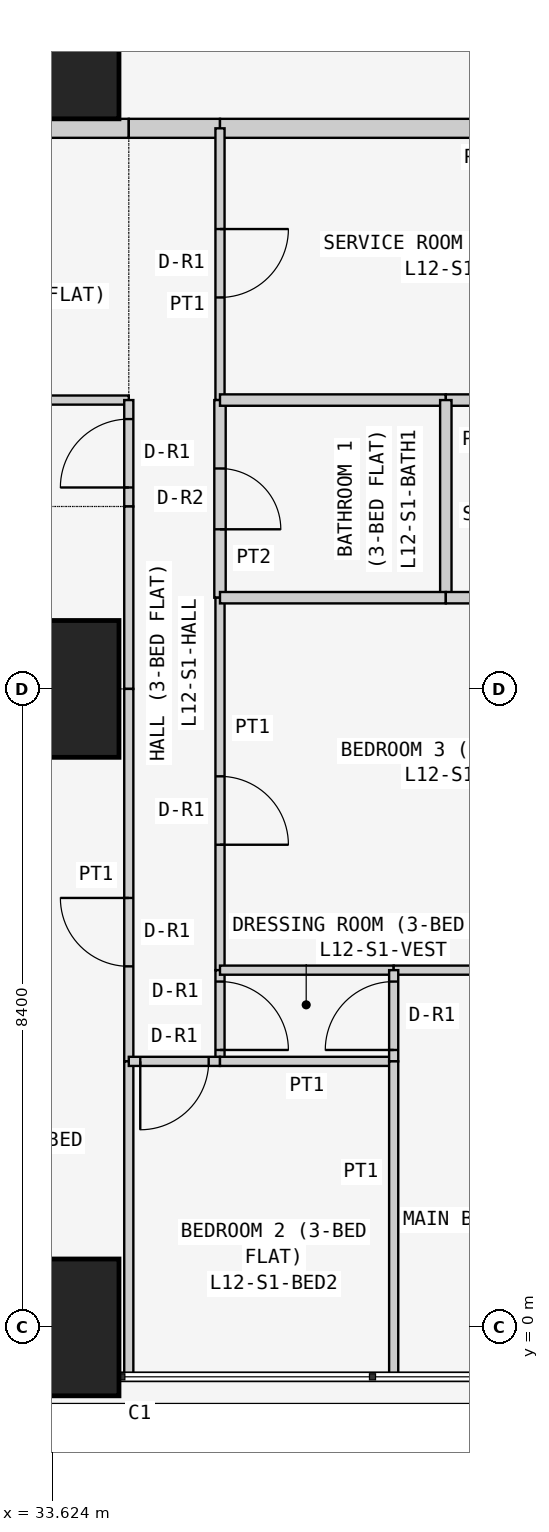
"""IFC4 building model, lengths in metres.
Left out: names, types, materials, properties, quantities, classifications, styles, units other than length and angle.
Written with IfcOpenShell. Run it as: python <this file> out.ifc"""

import sys

from ifc_helpers import new_model, si_unit, direction, frame, frame_2d, origin, origin_2d, place, context, subcontext, project, spatial, rectangle, extrude, element, fill, save


model = new_model("IFC4")
c1 = context("Model", 3, precision=1e-05, world=origin(), true_north=direction((0.0, 1.0)))
c2 = subcontext(c1, "Body", "Model", "MODEL_VIEW")
j1 = project(units=[si_unit("LENGTHUNIT", "METRE"), si_unit("PLANEANGLEUNIT", "RADIAN")], contexts=[c1])
p1 = place(None, origin())
s1 = spatial("IfcSite", under=j1, at=p1, CompositionType="ELEMENT")
p2 = place(p1, origin())
s2 = spatial("IfcBuilding", under=s1, at=p2, CompositionType="ELEMENT")
p3 = place(p2, frame((0.0, 0.0, 52.5)))
s3 = spatial("IfcBuildingStorey", under=s2, at=p3, CompositionType="ELEMENT", Elevation=52.5)
for number, where, z_axis, x_axis in (
    (1, (33.6, 0.0, 0.0), (0.0, 0.0, 1.0), (1.0, 0.0, 0.0)),
    (2, (33.6, 8.4, 0.0), (0.0, 0.0, 1.0), (1.0, 0.0, 0.0)),
    (3, (33.6, 16.8, 0.0), (0.0, 0.0, 1.0), (1.0, 0.0, 0.0)),
):
    element("IfcColumn", number, at=place(p3, frame(where, z_axis=z_axis, x_axis=x_axis)), inside=s3, PredefinedType="COLUMN", context=c2, shape_type="SweptSolid", body=[
        extrude(rectangle(XDim=1.8, YDim=1.8, at=origin_2d()), origin(), (0.0, 0.0, 1.0), 3.6),
    ])
p4 = place(p3, frame((34.629, 15.775, 0.0), z_axis=(0.0, 0.0, 1.0), x_axis=(-1.0, 0.0, 0.0)))
e4 = element("IfcWall", 4, at=p4, inside=s3, PredefinedType="PARTITIONING", context=c2, shape_type="SweptSolid", body=[
    extrude(rectangle(XDim=5.229, YDim=0.25, at=frame_2d((2.615, 0.0))), origin(), (0.0, 0.0, 1.0), 3.45),
])
p5 = place(p4, frame((2.129, 0.0, 0.0)))
e5 = element("IfcOpeningElement", 5, at=p5, cuts=e4, PredefinedType="OPENING", context=c2, shape_type="SweptSolid", body=[
    extrude(rectangle(XDim=1.0, YDim=2.1, at=frame_2d((0.5, 1.05))), frame((0.0, 0.135, 0.0), z_axis=(0.0, -1.0, 0.0), x_axis=(1.0, 0.0, 0.0)), (0.0, 0.0, 1.0), 0.27),
])
p6 = place(p3, frame((35.829, 15.775, 0.0), z_axis=(0.0, 0.0, 1.0), x_axis=(-1.0, 0.0, 0.0)))
e6 = element("IfcWall", 6, at=p6, inside=s3, PredefinedType="PARTITIONING", context=c2, shape_type="SweptSolid", body=[
    extrude(rectangle(XDim=1.2, YDim=0.25, at=frame_2d((0.6, 0.0))), origin(), (0.0, 0.0, 1.0), 3.45),
])
p7 = place(p3, frame((42.7, 15.775, 0.0), z_axis=(0.0, 0.0, 1.0), x_axis=(-1.0, 0.0, 0.0)))
e7 = element("IfcWall", 7, at=p7, inside=s3, PredefinedType="PARTITIONING", context=c2, shape_type="SweptSolid", body=[
    extrude(rectangle(XDim=6.871, YDim=0.25, at=frame_2d((3.436, 0.0))), origin(), (0.0, 0.0, 1.0), 3.45),
])
p8 = place(p3, frame((29.4, 12.2, 0.0), z_axis=(0.0, 0.0, 1.0), x_axis=(1.0, 0.0, 0.0)))
e8 = element("IfcWall", 8, at=p8, inside=s3, PredefinedType="PARTITIONING", context=c2, shape_type="SweptSolid", body=[
    extrude(rectangle(XDim=5.229, YDim=0.12, at=frame_2d((2.615, 0.0))), origin(), (0.0, 0.0, 1.0), 3.45),
])
p9 = place(p3, frame((34.629, 10.8, 0.0), z_axis=(0.0, 0.0, 1.0), x_axis=(0.0, 1.0, 0.0)))
e9 = element("IfcWall", 9, at=p9, inside=s3, PredefinedType="PARTITIONING", context=c2, shape_type="SweptSolid", body=[
    extrude(rectangle(XDim=1.4, YDim=0.12, at=frame_2d((0.7, 0.0))), origin(), (0.0, 0.0, 1.0), 3.45),
])
p10 = place(p9, frame((0.25, 0.0, 0.0)))
e10 = element("IfcOpeningElement", 10, at=p10, cuts=e9, PredefinedType="OPENING", context=c2, shape_type="SweptSolid", body=[
    extrude(rectangle(XDim=0.9, YDim=2.1, at=frame_2d((0.45, 1.05))), frame((0.0, 0.07, 0.0), z_axis=(0.0, -1.0, 0.0), x_axis=(1.0, 0.0, 0.0)), (0.0, 0.0, 1.0), 0.14),
])
p11 = place(p3, frame((34.629, 8.4, 0.0), z_axis=(0.0, 0.0, 1.0), x_axis=(0.0, 1.0, 0.0)))
e11 = element("IfcWall", 11, at=p11, inside=s3, PredefinedType="PARTITIONING", context=c2, shape_type="SweptSolid", body=[
    extrude(rectangle(XDim=2.4, YDim=0.12, at=frame_2d((1.2, 0.0))), origin(), (0.0, 0.0, 1.0), 3.45),
])
p12 = place(p3, frame((34.629, 3.5, 0.0), z_axis=(0.0, 0.0, 1.0), x_axis=(0.0, 1.0, 0.0)))
e12 = element("IfcWall", 12, at=p12, inside=s3, PredefinedType="PARTITIONING", context=c2, shape_type="SweptSolid", body=[
    extrude(rectangle(XDim=4.9, YDim=0.12, at=frame_2d((2.45, 0.0))), origin(), (0.0, 0.0, 1.0), 3.45),
])
p13 = place(p12, frame((1.25, 0.0, 0.0)))
e13 = element("IfcOpeningElement", 13, at=p13, cuts=e12, PredefinedType="OPENING", context=c2, shape_type="SweptSolid", body=[
    extrude(rectangle(XDim=0.9, YDim=2.1, at=frame_2d((0.45, 1.05))), frame((0.0, 0.07, 0.0), z_axis=(0.0, -1.0, 0.0), x_axis=(1.0, 0.0, 0.0)), (0.0, 0.0, 1.0), 0.14),
])
p14 = place(p3, frame((34.629, -0.65, 0.0), z_axis=(0.0, 0.0, 1.0), x_axis=(0.0, 1.0, 0.0)))
e14 = element("IfcWall", 14, at=p14, inside=s3, PredefinedType="PARTITIONING", context=c2, shape_type="SweptSolid", body=[
    extrude(rectangle(XDim=4.15, YDim=0.12, at=frame_2d((2.075, 0.0))), origin(), (0.0, 0.0, 1.0), 3.45),
])
p15 = place(p3, frame((35.829, 12.2, 0.0), z_axis=(0.0, 0.0, 1.0), x_axis=(0.0, 1.0, 0.0)))
e15 = element("IfcWall", 15, at=p15, inside=s3, PredefinedType="PARTITIONING", context=c2, shape_type="SweptSolid", body=[
    extrude(rectangle(XDim=3.575, YDim=0.12, at=frame_2d((1.788, 0.0))), origin(), (0.0, 0.0, 1.0), 3.45),
])
p16 = place(p15, frame((1.35, 0.0, 0.0)))
e16 = element("IfcOpeningElement", 16, at=p16, cuts=e15, PredefinedType="OPENING", context=c2, shape_type="SweptSolid", body=[
    extrude(rectangle(XDim=0.9, YDim=2.1, at=frame_2d((0.45, 1.05))), frame((0.0, 0.07, 0.0), z_axis=(0.0, -1.0, 0.0), x_axis=(1.0, 0.0, 0.0)), (0.0, 0.0, 1.0), 0.14),
])
p17 = place(p3, frame((35.829, 9.6, 0.0), z_axis=(0.0, 0.0, 1.0), x_axis=(0.0, 1.0, 0.0)))
e17 = element("IfcWall", 17, at=p17, inside=s3, PredefinedType="PARTITIONING", context=c2, shape_type="SweptSolid", body=[
    extrude(rectangle(XDim=2.6, YDim=0.15, at=frame_2d((1.3, 0.0))), origin(), (0.0, 0.0, 1.0), 3.45),
])
p18 = place(p17, frame((0.9, 0.0, 0.0)))
e18 = element("IfcOpeningElement", 18, at=p18, cuts=e17, PredefinedType="OPENING", context=c2, shape_type="SweptSolid", body=[
    extrude(rectangle(XDim=0.8, YDim=2.1, at=frame_2d((0.4, 1.05))), frame((0.0, 0.085, 0.0), z_axis=(0.0, -1.0, 0.0), x_axis=(1.0, 0.0, 0.0)), (0.0, 0.0, 1.0), 0.17),
])
p19 = place(p3, frame((35.829, 4.7, 0.0), z_axis=(0.0, 0.0, 1.0), x_axis=(0.0, 1.0, 0.0)))
e19 = element("IfcWall", 19, at=p19, inside=s3, PredefinedType="PARTITIONING", context=c2, shape_type="SweptSolid", body=[
    extrude(rectangle(XDim=4.9, YDim=0.12, at=frame_2d((2.45, 0.0))), origin(), (0.0, 0.0, 1.0), 3.45),
])
p20 = place(p19, frame((1.65, 0.0, 0.0)))
e20 = element("IfcOpeningElement", 20, at=p20, cuts=e19, PredefinedType="OPENING", context=c2, shape_type="SweptSolid", body=[
    extrude(rectangle(XDim=0.9, YDim=2.1, at=frame_2d((0.45, 1.05))), frame((0.0, 0.07, 0.0), z_axis=(0.0, -1.0, 0.0), x_axis=(1.0, 0.0, 0.0)), (0.0, 0.0, 1.0), 0.14),
])
p21 = place(p3, frame((35.829, 3.5, 0.0), z_axis=(0.0, 0.0, 1.0), x_axis=(0.0, 1.0, 0.0)))
e21 = element("IfcWall", 21, at=p21, inside=s3, PredefinedType="PARTITIONING", context=c2, shape_type="SweptSolid", body=[
    extrude(rectangle(XDim=1.2, YDim=0.12, at=frame_2d((0.6, 0.0))), origin(), (0.0, 0.0, 1.0), 3.45),
])
p22 = place(p21, frame((0.15, 0.0, 0.0)))
e22 = element("IfcOpeningElement", 22, at=p22, cuts=e21, PredefinedType="OPENING", context=c2, shape_type="SweptSolid", body=[
    extrude(rectangle(XDim=0.9, YDim=2.1, at=frame_2d((0.45, 1.05))), frame((0.0, 0.07, 0.0), z_axis=(0.0, -1.0, 0.0), x_axis=(1.0, 0.0, 0.0)), (0.0, 0.0, 1.0), 0.14),
])
p23 = place(p3, frame((34.629, 3.5, 0.0), z_axis=(0.0, 0.0, 1.0), x_axis=(1.0, 0.0, 0.0)))
e23 = element("IfcWall", 23, at=p23, inside=s3, PredefinedType="PARTITIONING", context=c2, shape_type="SweptSolid", body=[
    extrude(rectangle(XDim=1.2, YDim=0.12, at=frame_2d((0.6, 0.0))), origin(), (0.0, 0.0, 1.0), 3.45),
])
p24 = place(p23, frame((0.151, 0.0, 0.0)))
e24 = element("IfcOpeningElement", 24, at=p24, cuts=e23, PredefinedType="OPENING", context=c2, shape_type="SweptSolid", body=[
    extrude(rectangle(XDim=0.9, YDim=2.1, at=frame_2d((0.45, 1.05))), frame((0.0, 0.07, 0.0), z_axis=(0.0, -1.0, 0.0), x_axis=(1.0, 0.0, 0.0)), (0.0, 0.0, 1.0), 0.14),
])
p25 = place(p3, frame((35.829, 12.2, 0.0), z_axis=(0.0, 0.0, 1.0), x_axis=(1.0, 0.0, 0.0)))
e25 = element("IfcWall", 25, at=p25, inside=s3, PredefinedType="PARTITIONING", context=c2, shape_type="SweptSolid", body=[
    extrude(rectangle(XDim=2.971, YDim=0.15, at=frame_2d((1.485, 0.0))), origin(), (0.0, 0.0, 1.0), 3.45),
])
p26 = place(p3, frame((38.8, 12.2, 0.0), z_axis=(0.0, 0.0, 1.0), x_axis=(1.0, 0.0, 0.0)))
e26 = element("IfcWall", 26, at=p26, inside=s3, PredefinedType="PARTITIONING", context=c2, shape_type="SweptSolid", body=[
    extrude(rectangle(XDim=3.9, YDim=0.15, at=frame_2d((1.95, 0.0))), origin(), (0.0, 0.0, 1.0), 3.45),
])
p27 = place(p26, frame((1.45, 0.0, 0.0)))
e27 = element("IfcOpeningElement", 27, at=p27, cuts=e26, PredefinedType="OPENING", context=c2, shape_type="SweptSolid", body=[
    extrude(rectangle(XDim=0.8, YDim=2.1, at=frame_2d((0.4, 1.05))), frame((0.0, 0.085, 0.0), z_axis=(0.0, -1.0, 0.0), x_axis=(1.0, 0.0, 0.0)), (0.0, 0.0, 1.0), 0.17),
])
p28 = place(p3, frame((38.8, 9.6, 0.0), z_axis=(0.0, 0.0, 1.0), x_axis=(0.0, 1.0, 0.0)))
e28 = element("IfcWall", 28, at=p28, inside=s3, PredefinedType="PARTITIONING", context=c2, shape_type="SweptSolid", body=[
    extrude(rectangle(XDim=2.6, YDim=0.15, at=frame_2d((1.3, 0.0))), origin(), (0.0, 0.0, 1.0), 3.45),
])
p29 = place(p3, frame((35.829, 9.6, 0.0), z_axis=(0.0, 0.0, 1.0), x_axis=(1.0, 0.0, 0.0)))
e29 = element("IfcWall", 29, at=p29, inside=s3, PredefinedType="PARTITIONING", context=c2, shape_type="SweptSolid", body=[
    extrude(rectangle(XDim=2.971, YDim=0.15, at=frame_2d((1.485, 0.0))), origin(), (0.0, 0.0, 1.0), 3.45),
])
p30 = place(p3, frame((38.8, 9.6, 0.0), z_axis=(0.0, 0.0, 1.0), x_axis=(1.0, 0.0, 0.0)))
e30 = element("IfcWall", 30, at=p30, inside=s3, PredefinedType="PARTITIONING", context=c2, shape_type="SweptSolid", body=[
    extrude(rectangle(XDim=3.9, YDim=0.15, at=frame_2d((1.95, 0.0))), origin(), (0.0, 0.0, 1.0), 3.45),
])
p31 = place(p3, frame((35.829, 4.7, 0.0), z_axis=(0.0, 0.0, 1.0), x_axis=(1.0, 0.0, 0.0)))
e31 = element("IfcWall", 31, at=p31, inside=s3, PredefinedType="PARTITIONING", context=c2, shape_type="SweptSolid", body=[
    extrude(rectangle(XDim=2.285, YDim=0.12, at=frame_2d((1.143, 0.0))), origin(), (0.0, 0.0, 1.0), 3.45),
])
p32 = place(p3, frame((38.114, 4.7, 0.0), z_axis=(0.0, 0.0, 1.0), x_axis=(1.0, 0.0, 0.0)))
e32 = element("IfcWall", 32, at=p32, inside=s3, PredefinedType="PARTITIONING", context=c2, shape_type="SweptSolid", body=[
    extrude(rectangle(XDim=4.586, YDim=0.12, at=frame_2d((2.293, 0.0))), origin(), (0.0, 0.0, 1.0), 3.45),
])
p33 = place(p3, frame((35.829, 3.5, 0.0), z_axis=(0.0, 0.0, 1.0), x_axis=(1.0, 0.0, 0.0)))
e33 = element("IfcWall", 33, at=p33, inside=s3, PredefinedType="PARTITIONING", context=c2, shape_type="SweptSolid", body=[
    extrude(rectangle(XDim=2.285, YDim=0.12, at=frame_2d((1.143, 0.0))), origin(), (0.0, 0.0, 1.0), 3.45),
])
p34 = place(p3, frame((38.114, 3.5, 0.0), z_axis=(0.0, 0.0, 1.0), x_axis=(0.0, 1.0, 0.0)))
e34 = element("IfcWall", 34, at=p34, inside=s3, PredefinedType="PARTITIONING", context=c2, shape_type="SweptSolid", body=[
    extrude(rectangle(XDim=1.2, YDim=0.12, at=frame_2d((0.6, 0.0))), origin(), (0.0, 0.0, 1.0), 3.45),
])
p35 = place(p34, frame((0.15, 0.0, 0.0)))
e35 = element("IfcOpeningElement", 35, at=p35, cuts=e34, PredefinedType="OPENING", context=c2, shape_type="SweptSolid", body=[
    extrude(rectangle(XDim=0.9, YDim=2.1, at=frame_2d((0.45, 1.05))), frame((0.0, 0.07, 0.0), z_axis=(0.0, -1.0, 0.0), x_axis=(1.0, 0.0, 0.0)), (0.0, 0.0, 1.0), 0.14),
])
p36 = place(p3, frame((38.114, -0.65, 0.0), z_axis=(0.0, 0.0, 1.0), x_axis=(0.0, 1.0, 0.0)))
e36 = element("IfcWall", 36, at=p36, inside=s3, PredefinedType="PARTITIONING", context=c2, shape_type="SweptSolid", body=[
    extrude(rectangle(XDim=4.15, YDim=0.12, at=frame_2d((2.075, 0.0))), origin(), (0.0, 0.0, 1.0), 3.45),
])
p37 = place(p10, origin())
e37 = element("IfcDoor", 37, at=p37, inside=s3, OperationType="SINGLE_SWING_LEFT", PredefinedType="DOOR", context=c2, shape_type="SweptSolid", body=[
    extrude(rectangle(XDim=0.9, YDim=2.1, at=frame_2d((0.45, 1.05))), frame((0.0, 0.025, 0.0), z_axis=(0.0, -1.0, 0.0), x_axis=(1.0, 0.0, 0.0)), (0.0, 0.0, 1.0), 0.05),
])
fill(e10, e37)
p38 = place(p13, origin())
e38 = element("IfcDoor", 38, at=p38, inside=s3, OperationType="SINGLE_SWING_RIGHT", PredefinedType="DOOR", context=c2, shape_type="SweptSolid", body=[
    extrude(rectangle(XDim=0.9, YDim=2.1, at=frame_2d((0.45, 1.05))), frame((0.0, 0.025, 0.0), z_axis=(0.0, -1.0, 0.0), x_axis=(1.0, 0.0, 0.0)), (0.0, 0.0, 1.0), 0.05),
])
fill(e13, e38)
p39 = place(p16, frame((0.9, 0.0, 0.0), z_axis=(0.0, 0.0, 1.0), x_axis=(-1.0, 0.0, 0.0)))
e39 = element("IfcDoor", 39, at=p39, inside=s3, OperationType="SINGLE_SWING_LEFT", PredefinedType="DOOR", context=c2, shape_type="SweptSolid", body=[
    extrude(rectangle(XDim=0.9, YDim=2.1, at=frame_2d((0.45, 1.05))), frame((0.0, 0.025, 0.0), z_axis=(0.0, -1.0, 0.0), x_axis=(1.0, 0.0, 0.0)), (0.0, 0.0, 1.0), 0.05),
])
fill(e16, e39)
p40 = place(p18, frame((0.8, 0.0, 0.0), z_axis=(0.0, 0.0, 1.0), x_axis=(-1.0, 0.0, 0.0)))
e40 = element("IfcDoor", 40, at=p40, inside=s3, OperationType="SINGLE_SWING_RIGHT", PredefinedType="DOOR", context=c2, shape_type="SweptSolid", body=[
    extrude(rectangle(XDim=0.8, YDim=2.1, at=frame_2d((0.4, 1.05))), frame((0.0, 0.025, 0.0), z_axis=(0.0, -1.0, 0.0), x_axis=(1.0, 0.0, 0.0)), (0.0, 0.0, 1.0), 0.05),
])
fill(e18, e40)
p41 = place(p20, frame((0.9, 0.0, 0.0), z_axis=(0.0, 0.0, 1.0), x_axis=(-1.0, 0.0, 0.0)))
e41 = element("IfcDoor", 41, at=p41, inside=s3, OperationType="SINGLE_SWING_RIGHT", PredefinedType="DOOR", context=c2, shape_type="SweptSolid", body=[
    extrude(rectangle(XDim=0.9, YDim=2.1, at=frame_2d((0.45, 1.05))), frame((0.0, 0.025, 0.0), z_axis=(0.0, -1.0, 0.0), x_axis=(1.0, 0.0, 0.0)), (0.0, 0.0, 1.0), 0.05),
])
fill(e20, e41)
p42 = place(p22, frame((0.9, 0.0, 0.0), z_axis=(0.0, 0.0, 1.0), x_axis=(-1.0, 0.0, 0.0)))
e42 = element("IfcDoor", 42, at=p42, inside=s3, OperationType="SINGLE_SWING_RIGHT", PredefinedType="DOOR", context=c2, shape_type="SweptSolid", body=[
    extrude(rectangle(XDim=0.9, YDim=2.1, at=frame_2d((0.45, 1.05))), frame((0.0, 0.025, 0.0), z_axis=(0.0, -1.0, 0.0), x_axis=(1.0, 0.0, 0.0)), (0.0, 0.0, 1.0), 0.05),
])
fill(e22, e42)
p43 = place(p35, origin())
e43 = element("IfcDoor", 43, at=p43, inside=s3, OperationType="SINGLE_SWING_LEFT", PredefinedType="DOOR", context=c2, shape_type="SweptSolid", body=[
    extrude(rectangle(XDim=0.9, YDim=2.1, at=frame_2d((0.45, 1.05))), frame((0.0, 0.025, 0.0), z_axis=(0.0, -1.0, 0.0), x_axis=(1.0, 0.0, 0.0)), (0.0, 0.0, 1.0), 0.05),
])
fill(e35, e43)
p44 = place(p24, frame((0.9, 0.0, 0.0), z_axis=(0.0, 0.0, 1.0), x_axis=(-1.0, 0.0, 0.0)))
e44 = element("IfcDoor", 44, at=p44, inside=s3, OperationType="SINGLE_SWING_RIGHT", PredefinedType="DOOR", context=c2, shape_type="SweptSolid", body=[
    extrude(rectangle(XDim=0.9, YDim=2.1, at=frame_2d((0.45, 1.05))), frame((0.0, 0.025, 0.0), z_axis=(0.0, -1.0, 0.0), x_axis=(1.0, 0.0, 0.0)), (0.0, 0.0, 1.0), 0.05),
])
fill(e24, e44)
save(model, sys.argv[1])
